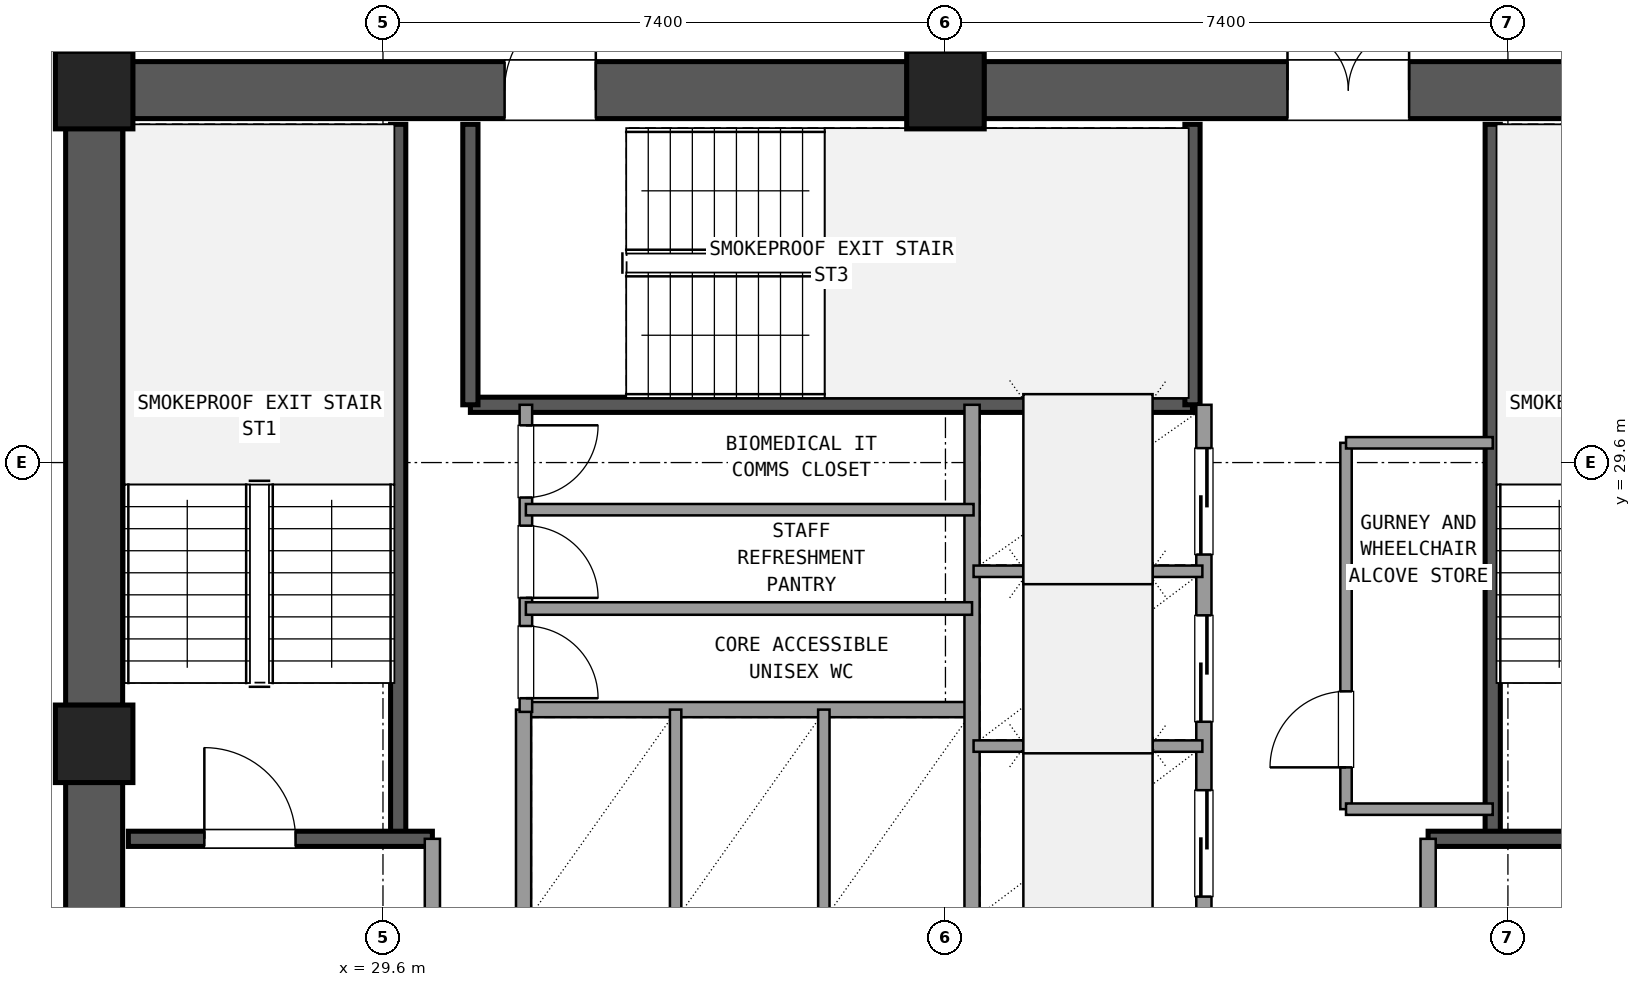
"""IFC4 building model, lengths in metres.
Left out: names, types, materials, properties, quantities, classifications, styles, units other than length and angle.
Written with IfcOpenShell. Run it as: python <this file> out.ifc"""

import sys

from ifc_helpers import new_model, si_unit, direction, frame, frame_2d, origin, origin_2d, place, context, subcontext, project, spatial, rectangle, extrude, element, fill, save


model = new_model("IFC4")
c1 = context("Model", 3, precision=1e-05, world=origin(), true_north=direction((0.0, 1.0)))
c2 = subcontext(c1, "Body", "Model", "MODEL_VIEW")
j1 = project(units=[si_unit("LENGTHUNIT", "METRE"), si_unit("PLANEANGLEUNIT", "RADIAN")], contexts=[c1])
p1 = place(None, origin())
s1 = spatial("IfcSite", under=j1, at=p1, CompositionType="ELEMENT")
p2 = place(p1, origin())
s2 = spatial("IfcBuilding", under=s1, at=p2, CompositionType="ELEMENT")
p3 = place(p2, frame((0.0, 0.0, 109.98)))
s3 = spatial("IfcBuildingStorey", under=s2, at=p3, CompositionType="ELEMENT", Elevation=109.98)
for number, where, z_axis, x_axis in (
    (1, (37.0, 34.5, 0.0), (0.0, 0.0, 1.0), (1.0, 0.0, 0.0)),
    (2, (25.8, 34.5, 0.0), (0.0, 0.0, 1.0), (1.0, 0.0, 0.0)),
    (3, (25.8, 25.9, 0.0), (0.0, 0.0, 1.0), (1.0, 0.0, 0.0)),
):
    element("IfcColumn", number, at=place(p3, frame(where, z_axis=z_axis, x_axis=x_axis)), inside=s3, PredefinedType="COLUMN", context=c2, shape_type="SweptSolid", body=[
        extrude(rectangle(XDim=1.02, YDim=1.02, at=origin_2d()), origin(), (0.0, 0.0, 1.0), 3.6),
    ])
p4 = place(p3, frame((47.695, 34.5, 0.0), z_axis=(0.0, 0.0, 1.0), x_axis=(-1.0, 0.0, 0.0)))
e4 = element("IfcWall", 4, at=p4, inside=s3, PredefinedType="SHEAR", context=c2, shape_type="SweptSolid", body=[
    extrude(rectangle(XDim=10.19, YDim=0.75, at=frame_2d((5.095, 0.0))), origin(), (0.0, 0.0, 1.0), 3.32),
])
p5 = place(p4, frame((4.595, 0.0, 0.0)))
e5 = element("IfcOpeningElement", 5, at=p5, cuts=e4, PredefinedType="OPENING", context=c2, shape_type="SweptSolid", body=[
    extrude(rectangle(XDim=1.6, YDim=2.2, at=frame_2d((0.8, 1.1))), frame((0.0, 0.385, 0.0), z_axis=(0.0, -1.0, 0.0), x_axis=(1.0, 0.0, 0.0)), (0.0, 0.0, 1.0), 0.77),
])
p6 = place(p3, frame((36.495, 34.5, 0.0), z_axis=(0.0, 0.0, 1.0), x_axis=(-1.0, 0.0, 0.0)))
e6 = element("IfcWall", 6, at=p6, inside=s3, PredefinedType="SHEAR", context=c2, shape_type="SweptSolid", body=[
    extrude(rectangle(XDim=10.19, YDim=0.75, at=frame_2d((5.095, 0.0))), origin(), (0.0, 0.0, 1.0), 3.32),
])
p7 = place(p6, frame((4.095, 0.0, 0.0)))
e7 = element("IfcOpeningElement", 7, at=p7, cuts=e6, PredefinedType="OPENING", context=c2, shape_type="SweptSolid", body=[
    extrude(rectangle(XDim=1.2, YDim=2.15, at=frame_2d((0.6, 1.075))), frame((0.0, 0.385, 0.0), z_axis=(0.0, -1.0, 0.0), x_axis=(1.0, 0.0, 0.0)), (0.0, 0.0, 1.0), 0.77),
])
p8 = place(p3, frame((25.8, 33.995, 0.0), z_axis=(0.0, 0.0, 1.0), x_axis=(0.0, -1.0, 0.0)))
e8 = element("IfcWall", 8, at=p8, inside=s3, PredefinedType="SHEAR", context=c2, shape_type="SweptSolid", body=[
    extrude(rectangle(XDim=7.59, YDim=0.75, at=frame_2d((3.795, 0.0))), origin(), (0.0, 0.0, 1.0), 3.32),
])
p9 = place(p3, frame((25.8, 25.395, 0.0), z_axis=(0.0, 0.0, 1.0), x_axis=(0.0, -1.0, 0.0)))
e9 = element("IfcWall", 9, at=p9, inside=s3, PredefinedType="SHEAR", context=c2, shape_type="SweptSolid", body=[
    extrude(rectangle(XDim=7.59, YDim=0.75, at=frame_2d((3.795, 0.0))), origin(), (0.0, 0.0, 1.0), 3.32),
])
p10 = place(p9, frame((2.145, 0.0, 0.0)))
e10 = element("IfcOpeningElement", 10, at=p10, cuts=e9, PredefinedType="OPENING", context=c2, shape_type="SweptSolid", body=[
    extrude(rectangle(XDim=1.2, YDim=2.15, at=frame_2d((0.6, 1.075))), frame((0.0, 0.385, 0.0), z_axis=(0.0, -1.0, 0.0), x_axis=(1.0, 0.0, 0.0)), (0.0, 0.0, 1.0), 0.77),
])
p11 = place(p3, frame((29.8, 24.65, 0.0), z_axis=(0.0, 0.0, 1.0), x_axis=(0.0, 1.0, 0.0)))
e11 = element("IfcWall", 11, at=p11, inside=s3, PredefinedType="SHEAR", context=c2, shape_type="SweptSolid", body=[
    extrude(rectangle(XDim=9.4, YDim=0.2, at=frame_2d((4.7, 0.0))), origin(), (0.0, 0.0, 1.0), 3.32),
])
p12 = place(p3, frame((26.25, 24.65, 0.0), z_axis=(0.0, 0.0, 1.0), x_axis=(1.0, 0.0, 0.0)))
e12 = element("IfcWall", 12, at=p12, inside=s3, PredefinedType="SHEAR", context=c2, shape_type="SweptSolid", body=[
    extrude(rectangle(XDim=4.0, YDim=0.2, at=frame_2d((2.0, 0.0))), origin(), (0.0, 0.0, 1.0), 3.32),
])
p13 = place(p12, frame((1.0, 0.0, 0.0)))
e13 = element("IfcOpeningElement", 13, at=p13, cuts=e12, PredefinedType="OPENING", context=c2, shape_type="SweptSolid", body=[
    extrude(rectangle(XDim=1.2, YDim=2.15, at=frame_2d((0.6, 1.075))), frame((0.0, 0.11, 0.0), z_axis=(0.0, -1.0, 0.0), x_axis=(1.0, 0.0, 0.0)), (0.0, 0.0, 1.0), 0.22),
])
p14 = place(p3, frame((44.2, 24.65, 0.0), z_axis=(0.0, 0.0, 1.0), x_axis=(0.0, 1.0, 0.0)))
e14 = element("IfcWall", 14, at=p14, inside=s3, PredefinedType="SHEAR", context=c2, shape_type="SweptSolid", body=[
    extrude(rectangle(XDim=9.4, YDim=0.2, at=frame_2d((4.7, 0.0))), origin(), (0.0, 0.0, 1.0), 3.32),
])
p15 = place(p3, frame((43.35, 24.65, 0.0), z_axis=(0.0, 0.0, 1.0), x_axis=(1.0, 0.0, 0.0)))
e15 = element("IfcWall", 15, at=p15, inside=s3, PredefinedType="SHEAR", context=c2, shape_type="SweptSolid", body=[
    extrude(rectangle(XDim=4.4, YDim=0.2, at=frame_2d((2.2, 0.0))), origin(), (0.0, 0.0, 1.0), 3.32),
])
p16 = place(p15, frame((2.0, 0.0, 0.0)))
e16 = element("IfcOpeningElement", 16, at=p16, cuts=e15, PredefinedType="OPENING", context=c2, shape_type="SweptSolid", body=[
    extrude(rectangle(XDim=1.2, YDim=2.15, at=frame_2d((0.6, 1.075))), frame((0.0, 0.11, 0.0), z_axis=(0.0, -1.0, 0.0), x_axis=(1.0, 0.0, 0.0)), (0.0, 0.0, 1.0), 0.22),
])
p17 = place(p3, frame((30.75, 30.36, 0.0), z_axis=(0.0, 0.0, 1.0), x_axis=(1.0, 0.0, 0.0)))
e17 = element("IfcWall", 17, at=p17, inside=s3, PredefinedType="SHEAR", context=c2, shape_type="SweptSolid", body=[
    extrude(rectangle(XDim=9.5, YDim=0.2, at=frame_2d((4.75, 0.0))), origin(), (0.0, 0.0, 1.0), 3.32),
])
for number, where, z_axis, x_axis in (
    (18, (30.75, 30.36, 0.0), (0.0, 0.0, 1.0), (0.0, 1.0, 0.0)),
    (19, (40.25, 30.36, 0.0), (0.0, 0.0, 1.0), (0.0, 1.0, 0.0)),
):
    element("IfcWall", number, at=place(p3, frame(where, z_axis=z_axis, x_axis=x_axis)), inside=s3, PredefinedType="SHEAR", context=c2, shape_type="SweptSolid", body=[
        extrude(rectangle(XDim=3.69, YDim=0.2, at=frame_2d((1.845, 0.0))), origin(), (0.0, 0.0, 1.0), 3.32),
    ])
p18 = place(p3, frame((30.25, 17.75, 0.0), z_axis=(0.0, 0.0, 1.0), x_axis=(0.0, 1.0, 0.0)))
e20 = element("IfcWall", 20, at=p18, inside=s3, PredefinedType="SOLIDWALL", context=c2, shape_type="SweptSolid", body=[
    extrude(rectangle(XDim=6.9, YDim=0.2, at=frame_2d((3.45, 0.0))), origin(), (0.0, 0.0, 1.0), 2.61),
])
p19 = place(p18, frame((4.15, 0.0, 0.0)))
e21 = element("IfcOpeningElement", 21, at=p19, cuts=e20, PredefinedType="OPENING", context=c2, shape_type="SweptSolid", body=[
    extrude(rectangle(XDim=1.2, YDim=2.15, at=frame_2d((0.6, 1.075))), frame((0.0, 0.11, 0.0), z_axis=(0.0, -1.0, 0.0), x_axis=(1.0, 0.0, 0.0)), (0.0, 0.0, 1.0), 0.22),
])
p20 = place(p3, frame((43.35, 17.75, 0.0), z_axis=(0.0, 0.0, 1.0), x_axis=(0.0, 1.0, 0.0)))
e22 = element("IfcWall", 22, at=p20, inside=s3, PredefinedType="SOLIDWALL", context=c2, shape_type="SweptSolid", body=[
    extrude(rectangle(XDim=6.9, YDim=0.2, at=frame_2d((3.45, 0.0))), origin(), (0.0, 0.0, 1.0), 2.61),
])
p21 = place(p20, frame((4.15, 0.0, 0.0)))
e23 = element("IfcOpeningElement", 23, at=p21, cuts=e22, PredefinedType="OPENING", context=c2, shape_type="SweptSolid", body=[
    extrude(rectangle(XDim=1.2, YDim=2.15, at=frame_2d((0.6, 1.075))), frame((0.0, 0.11, 0.0), z_axis=(0.0, -1.0, 0.0), x_axis=(1.0, 0.0, 0.0)), (0.0, 0.0, 1.0), 0.22),
])
p22 = place(p3, frame((31.45, 26.35, 0.0), z_axis=(0.0, 0.0, 1.0), x_axis=(1.0, 0.0, 0.0)))
e24 = element("IfcWall", 24, at=p22, inside=s3, PredefinedType="SOLIDWALL", context=c2, shape_type="SweptSolid", body=[
    extrude(rectangle(XDim=5.9, YDim=0.2, at=frame_2d((2.95, 0.0))), origin(), (0.0, 0.0, 1.0), 2.61),
])
p23 = place(p3, frame((31.45, 23.54, 0.0), z_axis=(0.0, 0.0, 1.0), x_axis=(0.0, 1.0, 0.0)))
e25 = element("IfcWall", 25, at=p23, inside=s3, PredefinedType="SOLIDWALL", context=c2, shape_type="SweptSolid", body=[
    extrude(rectangle(XDim=2.81, YDim=0.2, at=frame_2d((1.405, 0.0))), origin(), (0.0, 0.0, 1.0), 2.61),
])
for number, where, z_axis, x_axis in (
    (26, (33.45, 23.54, 0.0), (0.0, 0.0, 1.0), (0.0, 1.0, 0.0)),
    (27, (35.4, 23.54, 0.0), (0.0, 0.0, 1.0), (0.0, 1.0, 0.0)),
):
    element("IfcWall", number, at=place(p3, frame(where, z_axis=z_axis, x_axis=x_axis)), inside=s3, PredefinedType="PARTITIONING", context=c2, shape_type="SweptSolid", body=[
        extrude(rectangle(XDim=2.81, YDim=0.15, at=frame_2d((1.405, 0.0))), origin(), (0.0, 0.0, 1.0), 2.61),
    ])
p24 = place(p3, frame((37.35, 23.54, 0.0), z_axis=(0.0, 0.0, 1.0), x_axis=(0.0, 1.0, 0.0)))
e28 = element("IfcWall", 28, at=p24, inside=s3, PredefinedType="SOLIDWALL", context=c2, shape_type="SweptSolid", body=[
    extrude(rectangle(XDim=6.82, YDim=0.2, at=frame_2d((3.41, 0.0))), origin(), (0.0, 0.0, 1.0), 2.61),
])
p25 = place(p3, frame((40.4, 23.54, 0.0), z_axis=(0.0, 0.0, 1.0), x_axis=(0.0, 1.0, 0.0)))
e29 = element("IfcWall", 29, at=p25, inside=s3, PredefinedType="SOLIDWALL", context=c2, shape_type="SweptSolid", body=[
    extrude(rectangle(XDim=6.82, YDim=0.2, at=frame_2d((3.41, 0.0))), origin(), (0.0, 0.0, 1.0), 2.61),
])
p26 = place(p25, frame((0.35, 0.0, 0.0)))
e30 = element("IfcOpeningElement", 30, at=p26, cuts=e29, PredefinedType="OPENING", context=c2, shape_type="SweptSolid", body=[
    extrude(rectangle(XDim=1.4, YDim=2.2, at=frame_2d((0.7, 1.1))), frame((0.0, 0.11, 0.0), z_axis=(0.0, -1.0, 0.0), x_axis=(1.0, 0.0, 0.0)), (0.0, 0.0, 1.0), 0.22),
])
p27 = place(p25, frame((2.65, 0.0, 0.0)))
e31 = element("IfcOpeningElement", 31, at=p27, cuts=e29, PredefinedType="OPENING", context=c2, shape_type="SweptSolid", body=[
    extrude(rectangle(XDim=1.4, YDim=2.2, at=frame_2d((0.7, 1.1))), frame((0.0, 0.11, 0.0), z_axis=(0.0, -1.0, 0.0), x_axis=(1.0, 0.0, 0.0)), (0.0, 0.0, 1.0), 0.22),
])
p28 = place(p25, frame((4.85, 0.0, 0.0)))
e32 = element("IfcOpeningElement", 32, at=p28, cuts=e29, PredefinedType="OPENING", context=c2, shape_type="SweptSolid", body=[
    extrude(rectangle(XDim=1.4, YDim=2.2, at=frame_2d((0.7, 1.1))), frame((0.0, 0.11, 0.0), z_axis=(0.0, -1.0, 0.0), x_axis=(1.0, 0.0, 0.0)), (0.0, 0.0, 1.0), 0.22),
])
for number, where, z_axis, x_axis in (
    (33, (37.37, 25.87, 0.0), (0.0, 0.0, 1.0), (1.0, 0.0, 0.0)),
    (34, (37.37, 28.17, 0.0), (0.0, 0.0, 1.0), (1.0, 0.0, 0.0)),
):
    element("IfcWall", number, at=place(p3, frame(where, z_axis=z_axis, x_axis=x_axis)), inside=s3, PredefinedType="PARTITIONING", context=c2, shape_type="SweptSolid", body=[
        extrude(rectangle(XDim=3.01, YDim=0.15, at=frame_2d((1.505, 0.0))), origin(), (0.0, 0.0, 1.0), 2.61),
    ])
p29 = place(p3, frame((42.27, 25.04, 0.0), z_axis=(0.0, 0.0, 1.0), x_axis=(0.0, 1.0, 0.0)))
e35 = element("IfcWall", 35, at=p29, inside=s3, PredefinedType="PARTITIONING", context=c2, shape_type="SweptSolid", body=[
    extrude(rectangle(XDim=4.82, YDim=0.15, at=frame_2d((2.41, 0.0))), origin(), (0.0, 0.0, 1.0), 2.61),
])
p30 = place(p29, frame((0.55, 0.0, 0.0)))
e36 = element("IfcOpeningElement", 36, at=p30, cuts=e35, PredefinedType="OPENING", context=c2, shape_type="SweptSolid", body=[
    extrude(rectangle(XDim=1.0, YDim=2.15, at=frame_2d((0.5, 1.075))), frame((0.0, 0.085, 0.0), z_axis=(0.0, -1.0, 0.0), x_axis=(1.0, 0.0, 0.0)), (0.0, 0.0, 1.0), 0.17),
])
for number, where, z_axis, x_axis in (
    (37, (42.27, 25.04, 0.0), (0.0, 0.0, 1.0), (1.0, 0.0, 0.0)),
    (38, (42.27, 29.86, 0.0), (0.0, 0.0, 1.0), (1.0, 0.0, 0.0)),
):
    element("IfcWall", number, at=place(p3, frame(where, z_axis=z_axis, x_axis=x_axis)), inside=s3, PredefinedType="PARTITIONING", context=c2, shape_type="SweptSolid", body=[
        extrude(rectangle(XDim=1.93, YDim=0.15, at=frame_2d((0.965, 0.0))), origin(), (0.0, 0.0, 1.0), 2.61),
    ])
p31 = place(p3, frame((31.48, 26.32, 0.0), z_axis=(0.0, 0.0, 1.0), x_axis=(0.0, 1.0, 0.0)))
e39 = element("IfcWall", 39, at=p31, inside=s3, PredefinedType="PLUMBINGWALL", context=c2, shape_type="SweptSolid", body=[
    extrude(rectangle(XDim=4.04, YDim=0.165, at=frame_2d((2.02, 0.0))), origin(), (0.0, 0.0, 1.0), 2.61),
])
p32 = place(p31, frame((0.18, 0.0, 0.0)))
e40 = element("IfcOpeningElement", 40, at=p32, cuts=e39, PredefinedType="OPENING", context=c2, shape_type="SweptSolid", body=[
    extrude(rectangle(XDim=0.95, YDim=2.1, at=frame_2d((0.475, 1.05))), frame((0.0, 0.093, 0.0), z_axis=(0.0, -1.0, 0.0), x_axis=(1.0, 0.0, 0.0)), (0.0, 0.0, 1.0), 0.185),
])
p33 = place(p31, frame((1.5, 0.0, 0.0)))
e41 = element("IfcOpeningElement", 41, at=p33, cuts=e39, PredefinedType="OPENING", context=c2, shape_type="SweptSolid", body=[
    extrude(rectangle(XDim=0.95, YDim=2.1, at=frame_2d((0.475, 1.05))), frame((0.0, 0.093, 0.0), z_axis=(0.0, -1.0, 0.0), x_axis=(1.0, 0.0, 0.0)), (0.0, 0.0, 1.0), 0.185),
])
p34 = place(p31, frame((2.82, 0.0, 0.0)))
e42 = element("IfcOpeningElement", 42, at=p34, cuts=e39, PredefinedType="OPENING", context=c2, shape_type="SweptSolid", body=[
    extrude(rectangle(XDim=0.95, YDim=2.1, at=frame_2d((0.475, 1.05))), frame((0.0, 0.093, 0.0), z_axis=(0.0, -1.0, 0.0), x_axis=(1.0, 0.0, 0.0)), (0.0, 0.0, 1.0), 0.185),
])
p35 = place(p3, frame((31.48, 27.68, 0.0), z_axis=(0.0, 0.0, 1.0), x_axis=(1.0, 0.0, 0.0)))
e43 = element("IfcWall", 43, at=p35, inside=s3, PredefinedType="PLUMBINGWALL", context=c2, shape_type="SweptSolid", body=[
    extrude(rectangle(XDim=5.87, YDim=0.165, at=frame_2d((2.935, 0.0))), origin(), (0.0, 0.0, 1.0), 2.61),
])
p36 = place(p3, frame((31.48, 28.98, 0.0), z_axis=(0.0, 0.0, 1.0), x_axis=(1.0, 0.0, 0.0)))
e44 = element("IfcWall", 44, at=p36, inside=s3, PredefinedType="PARTITIONING", context=c2, shape_type="SweptSolid", body=[
    extrude(rectangle(XDim=5.89, YDim=0.15, at=frame_2d((2.945, 0.0))), origin(), (0.0, 0.0, 1.0), 2.61),
])
p37 = place(p3, frame((37.0, 34.95, 0.0), z_axis=(0.0, 0.0, 1.0), x_axis=(0.0, 1.0, 0.0)))
e45 = element("IfcWall", 45, at=p37, inside=s3, PredefinedType="PARTITIONING", context=c2, shape_type="SweptSolid", body=[
    extrude(rectangle(XDim=3.21, YDim=0.18, at=frame_2d((1.605, 0.0))), origin(), (0.0, 0.0, 1.0), 2.61),
])
p38 = place(p37, frame((0.605, 0.0, 0.0)))
e46 = element("IfcOpeningElement", 46, at=p38, cuts=e45, PredefinedType="OPENING", context=c2, shape_type="SweptSolid", body=[
    extrude(rectangle(XDim=2.0, YDim=2.2, at=frame_2d((1.0, 1.1))), frame((0.0, 0.1, 0.0), z_axis=(0.0, -1.0, 0.0), x_axis=(1.0, 0.0, 0.0)), (0.0, 0.0, 1.0), 0.2),
])
p39 = place(p13, origin())
e47 = element("IfcDoor", 47, at=p39, inside=s3, OperationType="SINGLE_SWING_LEFT", PredefinedType="DOOR", context=c2, shape_type="SweptSolid", body=[
    extrude(rectangle(XDim=1.2, YDim=2.15, at=frame_2d((0.6, 1.075))), frame((0.0, 0.025, 0.0), z_axis=(0.0, -1.0, 0.0), x_axis=(1.0, 0.0, 0.0)), (0.0, 0.0, 1.0), 0.05),
])
fill(e13, e47)
p40 = place(p5, frame((1.6, 0.0, 0.0), z_axis=(0.0, 0.0, 1.0), x_axis=(-1.0, 0.0, 0.0)))
e48 = element("IfcDoor", 48, at=p40, inside=s3, OperationType="DOUBLE_DOOR_SINGLE_SWING", PredefinedType="DOOR", context=c2, shape_type="SweptSolid", body=[
    extrude(rectangle(XDim=1.6, YDim=2.2, at=frame_2d((0.8, 1.1))), frame((0.0, 0.025, 0.0), z_axis=(0.0, -1.0, 0.0), x_axis=(1.0, 0.0, 0.0)), (0.0, 0.0, 1.0), 0.05),
])
fill(e5, e48)
p41 = place(p7, frame((1.2, 0.0, 0.0), z_axis=(0.0, 0.0, 1.0), x_axis=(-1.0, 0.0, 0.0)))
e49 = element("IfcDoor", 49, at=p41, inside=s3, OperationType="SINGLE_SWING_LEFT", PredefinedType="DOOR", context=c2, shape_type="SweptSolid", body=[
    extrude(rectangle(XDim=1.2, YDim=2.15, at=frame_2d((0.6, 1.075))), frame((0.0, 0.025, 0.0), z_axis=(0.0, -1.0, 0.0), x_axis=(1.0, 0.0, 0.0)), (0.0, 0.0, 1.0), 0.05),
])
fill(e7, e49)
p42 = place(p26, origin())
e50 = element("IfcDoor", 50, at=p42, inside=s3, OperationType="SLIDING_TO_LEFT", PredefinedType="DOOR", context=c2, shape_type="SweptSolid", body=[
    extrude(rectangle(XDim=1.4, YDim=2.2, at=frame_2d((0.7, 1.1))), frame((0.0, 0.025, 0.0), z_axis=(0.0, -1.0, 0.0), x_axis=(1.0, 0.0, 0.0)), (0.0, 0.0, 1.0), 0.05),
])
fill(e30, e50)
p43 = place(p27, origin())
e51 = element("IfcDoor", 51, at=p43, inside=s3, OperationType="SLIDING_TO_LEFT", PredefinedType="DOOR", context=c2, shape_type="SweptSolid", body=[
    extrude(rectangle(XDim=1.4, YDim=2.2, at=frame_2d((0.7, 1.1))), frame((0.0, 0.025, 0.0), z_axis=(0.0, -1.0, 0.0), x_axis=(1.0, 0.0, 0.0)), (0.0, 0.0, 1.0), 0.05),
])
fill(e31, e51)
p44 = place(p28, origin())
e52 = element("IfcDoor", 52, at=p44, inside=s3, OperationType="SLIDING_TO_RIGHT", PredefinedType="DOOR", context=c2, shape_type="SweptSolid", body=[
    extrude(rectangle(XDim=1.4, YDim=2.2, at=frame_2d((0.7, 1.1))), frame((0.0, 0.025, 0.0), z_axis=(0.0, -1.0, 0.0), x_axis=(1.0, 0.0, 0.0)), (0.0, 0.0, 1.0), 0.05),
])
fill(e32, e52)
p45 = place(p30, origin())
e53 = element("IfcDoor", 53, at=p45, inside=s3, OperationType="SINGLE_SWING_LEFT", PredefinedType="DOOR", context=c2, shape_type="SweptSolid", body=[
    extrude(rectangle(XDim=1.0, YDim=2.15, at=frame_2d((0.5, 1.075))), frame((0.0, 0.025, 0.0), z_axis=(0.0, -1.0, 0.0), x_axis=(1.0, 0.0, 0.0)), (0.0, 0.0, 1.0), 0.05),
])
fill(e36, e53)
p46 = place(p32, frame((0.95, 0.0, 0.0), z_axis=(0.0, 0.0, 1.0), x_axis=(-1.0, 0.0, 0.0)))
e54 = element("IfcDoor", 54, at=p46, inside=s3, OperationType="SINGLE_SWING_LEFT", PredefinedType="DOOR", context=c2, shape_type="SweptSolid", body=[
    extrude(rectangle(XDim=0.95, YDim=2.1, at=frame_2d((0.475, 1.05))), frame((0.0, 0.025, 0.0), z_axis=(0.0, -1.0, 0.0), x_axis=(1.0, 0.0, 0.0)), (0.0, 0.0, 1.0), 0.05),
])
fill(e40, e54)
p47 = place(p33, frame((0.95, 0.0, 0.0), z_axis=(0.0, 0.0, 1.0), x_axis=(-1.0, 0.0, 0.0)))
e55 = element("IfcDoor", 55, at=p47, inside=s3, OperationType="SINGLE_SWING_LEFT", PredefinedType="DOOR", context=c2, shape_type="SweptSolid", body=[
    extrude(rectangle(XDim=0.95, YDim=2.1, at=frame_2d((0.475, 1.05))), frame((0.0, 0.025, 0.0), z_axis=(0.0, -1.0, 0.0), x_axis=(1.0, 0.0, 0.0)), (0.0, 0.0, 1.0), 0.05),
])
fill(e41, e55)
p48 = place(p34, frame((0.95, 0.0, 0.0), z_axis=(0.0, 0.0, 1.0), x_axis=(-1.0, 0.0, 0.0)))
e56 = element("IfcDoor", 56, at=p48, inside=s3, OperationType="SINGLE_SWING_RIGHT", PredefinedType="DOOR", context=c2, shape_type="SweptSolid", body=[
    extrude(rectangle(XDim=0.95, YDim=2.1, at=frame_2d((0.475, 1.05))), frame((0.0, 0.025, 0.0), z_axis=(0.0, -1.0, 0.0), x_axis=(1.0, 0.0, 0.0)), (0.0, 0.0, 1.0), 0.05),
])
fill(e42, e56)
save(model, sys.argv[1])
